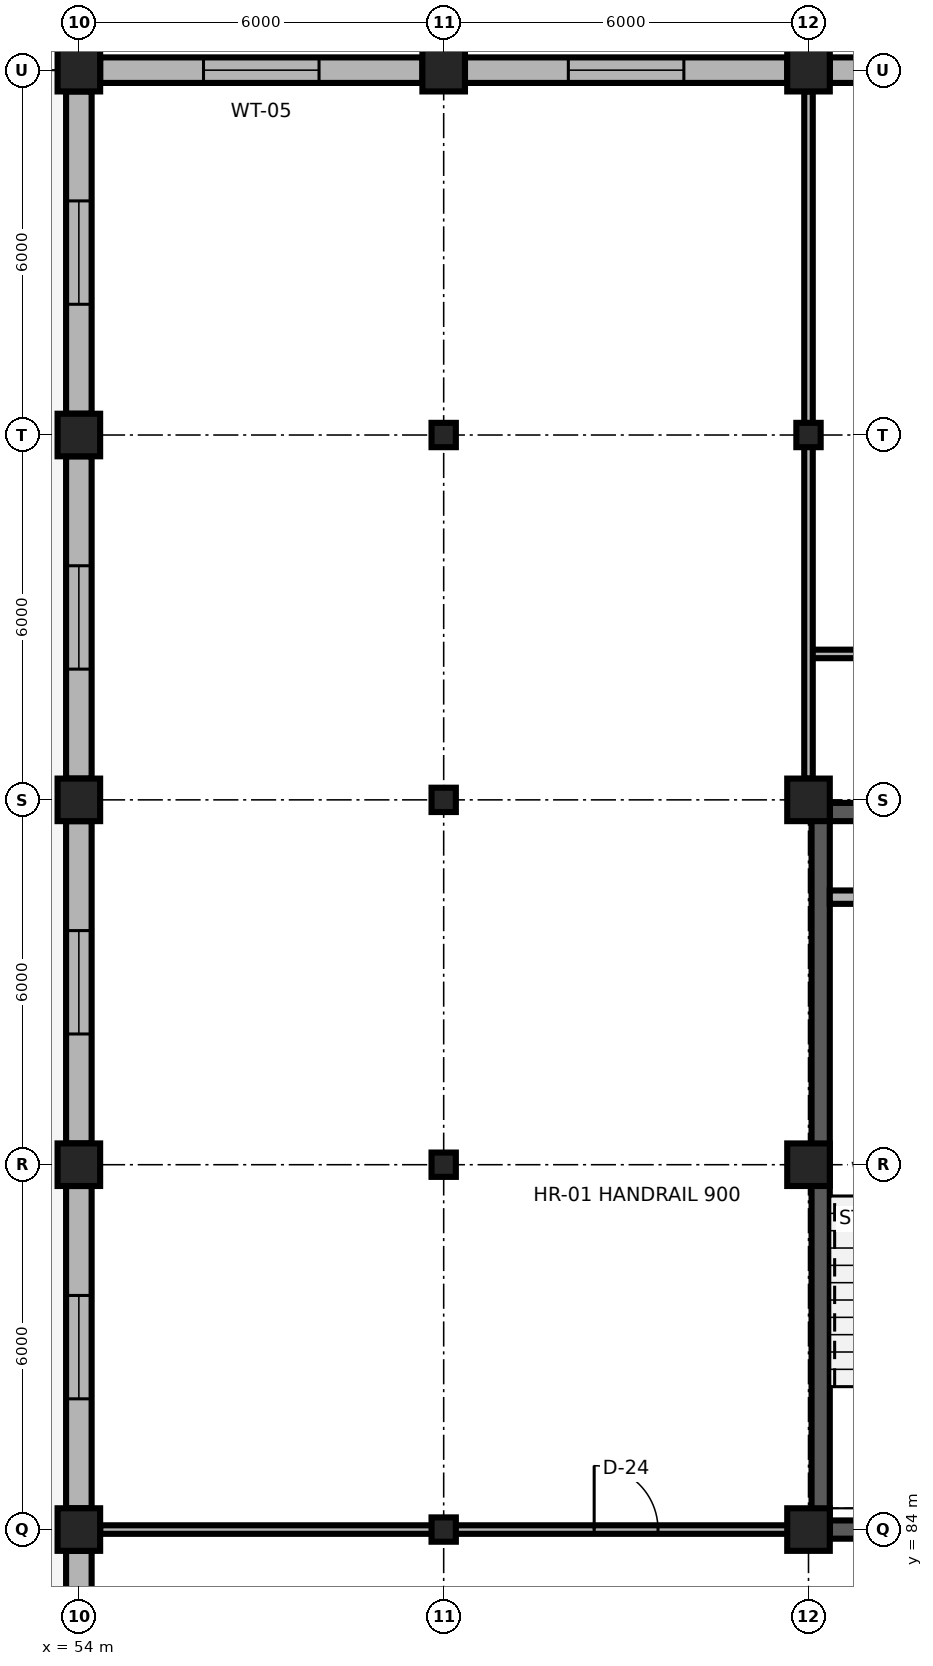
"""IFC4 building model, lengths in metres.
Left out: names, types, materials, properties, quantities, classifications, styles, units other than length and angle.
Written with IfcOpenShell. Run it as: python <this file> out.ifc"""

import sys

from ifc_helpers import new_model, si_unit, direction, frame, frame_2d, origin, origin_2d, place, context, subcontext, project, spatial, rectangle, i_section, extrude, element, fill, save


model = new_model("IFC4")
c1 = context("Model", 3, precision=1e-05, world=origin(), true_north=direction((0.0, 1.0)))
c2 = subcontext(c1, "Body", "Model", "MODEL_VIEW")
j1 = project(units=[si_unit("LENGTHUNIT", "METRE"), si_unit("PLANEANGLEUNIT", "RADIAN")], contexts=[c1])
p1 = place(None, origin())
s1 = spatial("IfcSite", under=j1, at=p1, CompositionType="ELEMENT")
p2 = place(p1, origin())
s2 = spatial("IfcBuilding", under=s1, at=p2, CompositionType="ELEMENT")
p3 = place(p2, frame((0.0, 0.0, 24.9)))
s3 = spatial("IfcBuildingStorey", under=s2, at=p3, CompositionType="ELEMENT", Elevation=24.9)
p4 = place(p3, frame((54.0, 84.0, 0.0), z_axis=(0.0, 0.0, 1.0), x_axis=(1.0, 0.0, 0.0)))
e1 = element("IfcColumn", 1, at=p4, inside=s3, PredefinedType="COLUMN", context=c2, shape_type="SweptSolid", body=[
    extrude(rectangle(XDim=0.7, YDim=0.7, at=origin_2d()), origin(), (0.0, 0.0, 1.0), 3.9),
])
p5 = place(p3, frame((60.0, 84.0, 0.0), z_axis=(0.0, 0.0, 1.0), x_axis=(1.0, 0.0, 0.0)))
e2 = element("IfcColumn", 2, at=p5, inside=s3, PredefinedType="COLUMN", context=c2, shape_type="SweptSolid", body=[
    extrude(i_section(OverallWidth=0.4, OverallDepth=0.4, WebThickness=0.013, FlangeThickness=0.021, FilletRadius=0.022, at=origin_2d()), origin(), (0.0, 0.0, 1.0), 3.9),
])
for number, where, z_axis, x_axis in (
    (3, (66.0, 84.0, 0.0), (0.0, 0.0, 1.0), (1.0, 0.0, 0.0)),
    (4, (54.0, 90.0, 0.0), (0.0, 0.0, 1.0), (1.0, 0.0, 0.0)),
):
    element("IfcColumn", number, at=place(p3, frame(where, z_axis=z_axis, x_axis=x_axis)), inside=s3, PredefinedType="COLUMN", context=c2, shape_type="SweptSolid", body=[
        extrude(rectangle(XDim=0.7, YDim=0.7, at=origin_2d()), origin(), (0.0, 0.0, 1.0), 3.9),
    ])
p6 = place(p3, frame((60.0, 90.0, 0.0), z_axis=(0.0, 0.0, 1.0), x_axis=(1.0, 0.0, 0.0)))
e5 = element("IfcColumn", 5, at=p6, inside=s3, PredefinedType="COLUMN", context=c2, shape_type="SweptSolid", body=[
    extrude(i_section(OverallWidth=0.4, OverallDepth=0.4, WebThickness=0.013, FlangeThickness=0.021, FilletRadius=0.022, at=origin_2d()), origin(), (0.0, 0.0, 1.0), 3.9),
])
for number, where, z_axis, x_axis in (
    (6, (66.0, 90.0, 0.0), (0.0, 0.0, 1.0), (1.0, 0.0, 0.0)),
    (7, (54.0, 96.0, 0.0), (0.0, 0.0, 1.0), (1.0, 0.0, 0.0)),
):
    element("IfcColumn", number, at=place(p3, frame(where, z_axis=z_axis, x_axis=x_axis)), inside=s3, PredefinedType="COLUMN", context=c2, shape_type="SweptSolid", body=[
        extrude(rectangle(XDim=0.7, YDim=0.7, at=origin_2d()), origin(), (0.0, 0.0, 1.0), 3.9),
    ])
p7 = place(p3, frame((60.0, 96.0, 0.0), z_axis=(0.0, 0.0, 1.0), x_axis=(1.0, 0.0, 0.0)))
e8 = element("IfcColumn", 8, at=p7, inside=s3, PredefinedType="COLUMN", context=c2, shape_type="SweptSolid", body=[
    extrude(i_section(OverallWidth=0.4, OverallDepth=0.4, WebThickness=0.013, FlangeThickness=0.021, FilletRadius=0.022, at=origin_2d()), origin(), (0.0, 0.0, 1.0), 3.9),
])
for number, where, z_axis, x_axis in (
    (9, (66.0, 96.0, 0.0), (0.0, 0.0, 1.0), (1.0, 0.0, 0.0)),
    (10, (54.0, 102.0, 0.0), (0.0, 0.0, 1.0), (1.0, 0.0, 0.0)),
):
    element("IfcColumn", number, at=place(p3, frame(where, z_axis=z_axis, x_axis=x_axis)), inside=s3, PredefinedType="COLUMN", context=c2, shape_type="SweptSolid", body=[
        extrude(rectangle(XDim=0.7, YDim=0.7, at=origin_2d()), origin(), (0.0, 0.0, 1.0), 3.9),
    ])
for number, where, z_axis, x_axis in (
    (11, (60.0, 102.0, 0.0), (0.0, 0.0, 1.0), (1.0, 0.0, 0.0)),
    (12, (66.0, 102.0, 0.0), (0.0, 0.0, 1.0), (1.0, 0.0, 0.0)),
):
    element("IfcColumn", number, at=place(p3, frame(where, z_axis=z_axis, x_axis=x_axis)), inside=s3, PredefinedType="COLUMN", context=c2, shape_type="SweptSolid", body=[
        extrude(i_section(OverallWidth=0.4, OverallDepth=0.4, WebThickness=0.013, FlangeThickness=0.021, FilletRadius=0.022, at=origin_2d()), origin(), (0.0, 0.0, 1.0), 3.9),
    ])
for number, where, z_axis, x_axis in (
    (13, (54.0, 108.0, 0.0), (0.0, 0.0, 1.0), (1.0, 0.0, 0.0)),
    (14, (60.0, 108.0, 0.0), (0.0, 0.0, 1.0), (1.0, 0.0, 0.0)),
    (15, (66.0, 108.0, 0.0), (0.0, 0.0, 1.0), (1.0, 0.0, 0.0)),
):
    element("IfcColumn", number, at=place(p3, frame(where, z_axis=z_axis, x_axis=x_axis)), inside=s3, PredefinedType="COLUMN", context=c2, shape_type="SweptSolid", body=[
        extrude(rectangle(XDim=0.7, YDim=0.7, at=origin_2d()), origin(), (0.0, 0.0, 1.0), 3.9),
    ])
p8 = place(p3, frame((54.35, 108.0, 0.0), z_axis=(0.0, 0.0, 1.0), x_axis=(1.0, 0.0, 0.0)))
e16 = element("IfcWall", 16, at=p8, inside=s3, PredefinedType="SOLIDWALL", context=c2, shape_type="SweptSolid", body=[
    extrude(rectangle(XDim=5.3, YDim=0.42, at=frame_2d((2.65, 0.0))), origin(), (0.0, 0.0, 1.0), 3.32),
])
p9 = place(p8, frame((1.7, 0.0, 0.85)))
e17 = element("IfcOpeningElement", 17, at=p9, cuts=e16, PredefinedType="OPENING", context=c2, shape_type="SweptSolid", body=[
    extrude(rectangle(XDim=1.9, YDim=2.1, at=frame_2d((0.95, 1.05))), frame((0.0, 0.225, 0.0), z_axis=(0.0, -1.0, 0.0), x_axis=(1.0, 0.0, 0.0)), (0.0, 0.0, 1.0), 0.45),
])
p10 = place(p3, frame((60.35, 108.0, 0.0), z_axis=(0.0, 0.0, 1.0), x_axis=(1.0, 0.0, 0.0)))
e18 = element("IfcWall", 18, at=p10, inside=s3, PredefinedType="SOLIDWALL", context=c2, shape_type="SweptSolid", body=[
    extrude(rectangle(XDim=5.3, YDim=0.42, at=frame_2d((2.65, 0.0))), origin(), (0.0, 0.0, 1.0), 3.32),
])
p11 = place(p10, frame((1.7, 0.0, 0.85)))
e19 = element("IfcOpeningElement", 19, at=p11, cuts=e18, PredefinedType="OPENING", context=c2, shape_type="SweptSolid", body=[
    extrude(rectangle(XDim=1.9, YDim=2.1, at=frame_2d((0.95, 1.05))), frame((0.0, 0.225, 0.0), z_axis=(0.0, -1.0, 0.0), x_axis=(1.0, 0.0, 0.0)), (0.0, 0.0, 1.0), 0.45),
])
p12 = place(p3, frame((66.35, 108.0, 0.0), z_axis=(0.0, 0.0, 1.0), x_axis=(1.0, 0.0, 0.0)))
e20 = element("IfcWall", 20, at=p12, inside=s3, PredefinedType="SOLIDWALL", context=c2, shape_type="SweptSolid", body=[
    extrude(rectangle(XDim=5.3, YDim=0.42, at=frame_2d((2.65, 0.0))), origin(), (0.0, 0.0, 1.0), 3.32),
])
p13 = place(p12, frame((1.7, 0.0, 0.85)))
e21 = element("IfcOpeningElement", 21, at=p13, cuts=e20, PredefinedType="OPENING", context=c2, shape_type="SweptSolid", body=[
    extrude(rectangle(XDim=1.9, YDim=2.1, at=frame_2d((0.95, 1.05))), frame((0.0, 0.225, 0.0), z_axis=(0.0, -1.0, 0.0), x_axis=(1.0, 0.0, 0.0)), (0.0, 0.0, 1.0), 0.45),
])
p14 = place(p3, frame((54.0, 78.35, 0.0), z_axis=(0.0, 0.0, 1.0), x_axis=(0.0, 1.0, 0.0)))
e22 = element("IfcWall", 22, at=p14, inside=s3, PredefinedType="SOLIDWALL", context=c2, shape_type="SweptSolid", body=[
    extrude(rectangle(XDim=5.3, YDim=0.42, at=frame_2d((2.65, 0.0))), origin(), (0.0, 0.0, 1.0), 3.32),
])
p15 = place(p14, frame((1.8, 0.0, 0.85)))
e23 = element("IfcOpeningElement", 23, at=p15, cuts=e22, PredefinedType="OPENING", context=c2, shape_type="SweptSolid", body=[
    extrude(rectangle(XDim=1.7, YDim=2.05, at=frame_2d((0.85, 1.025))), frame((0.0, 0.225, 0.0), z_axis=(0.0, -1.0, 0.0), x_axis=(1.0, 0.0, 0.0)), (0.0, 0.0, 1.0), 0.45),
])
p16 = place(p3, frame((54.0, 84.35, 0.0), z_axis=(0.0, 0.0, 1.0), x_axis=(0.0, 1.0, 0.0)))
e24 = element("IfcWall", 24, at=p16, inside=s3, PredefinedType="SOLIDWALL", context=c2, shape_type="SweptSolid", body=[
    extrude(rectangle(XDim=5.3, YDim=0.42, at=frame_2d((2.65, 0.0))), origin(), (0.0, 0.0, 1.0), 3.32),
])
p17 = place(p16, frame((1.8, 0.0, 0.85)))
e25 = element("IfcOpeningElement", 25, at=p17, cuts=e24, PredefinedType="OPENING", context=c2, shape_type="SweptSolid", body=[
    extrude(rectangle(XDim=1.7, YDim=2.05, at=frame_2d((0.85, 1.025))), frame((0.0, 0.225, 0.0), z_axis=(0.0, -1.0, 0.0), x_axis=(1.0, 0.0, 0.0)), (0.0, 0.0, 1.0), 0.45),
])
p18 = place(p3, frame((54.0, 90.35, 0.0), z_axis=(0.0, 0.0, 1.0), x_axis=(0.0, 1.0, 0.0)))
e26 = element("IfcWall", 26, at=p18, inside=s3, PredefinedType="SOLIDWALL", context=c2, shape_type="SweptSolid", body=[
    extrude(rectangle(XDim=5.3, YDim=0.42, at=frame_2d((2.65, 0.0))), origin(), (0.0, 0.0, 1.0), 3.32),
])
p19 = place(p18, frame((1.8, 0.0, 0.85)))
e27 = element("IfcOpeningElement", 27, at=p19, cuts=e26, PredefinedType="OPENING", context=c2, shape_type="SweptSolid", body=[
    extrude(rectangle(XDim=1.7, YDim=2.05, at=frame_2d((0.85, 1.025))), frame((0.0, 0.225, 0.0), z_axis=(0.0, -1.0, 0.0), x_axis=(1.0, 0.0, 0.0)), (0.0, 0.0, 1.0), 0.45),
])
p20 = place(p3, frame((54.0, 96.35, 0.0), z_axis=(0.0, 0.0, 1.0), x_axis=(0.0, 1.0, 0.0)))
e28 = element("IfcWall", 28, at=p20, inside=s3, PredefinedType="SOLIDWALL", context=c2, shape_type="SweptSolid", body=[
    extrude(rectangle(XDim=5.3, YDim=0.42, at=frame_2d((2.65, 0.0))), origin(), (0.0, 0.0, 1.0), 3.32),
])
p21 = place(p20, frame((1.8, 0.0, 0.85)))
e29 = element("IfcOpeningElement", 29, at=p21, cuts=e28, PredefinedType="OPENING", context=c2, shape_type="SweptSolid", body=[
    extrude(rectangle(XDim=1.7, YDim=2.05, at=frame_2d((0.85, 1.025))), frame((0.0, 0.225, 0.0), z_axis=(0.0, -1.0, 0.0), x_axis=(1.0, 0.0, 0.0)), (0.0, 0.0, 1.0), 0.45),
])
p22 = place(p3, frame((54.0, 102.35, 0.0), z_axis=(0.0, 0.0, 1.0), x_axis=(0.0, 1.0, 0.0)))
e30 = element("IfcWall", 30, at=p22, inside=s3, PredefinedType="SOLIDWALL", context=c2, shape_type="SweptSolid", body=[
    extrude(rectangle(XDim=5.3, YDim=0.42, at=frame_2d((2.65, 0.0))), origin(), (0.0, 0.0, 1.0), 3.32),
])
p23 = place(p22, frame((1.8, 0.0, 0.85)))
e31 = element("IfcOpeningElement", 31, at=p23, cuts=e30, PredefinedType="OPENING", context=c2, shape_type="SweptSolid", body=[
    extrude(rectangle(XDim=1.7, YDim=2.05, at=frame_2d((0.85, 1.025))), frame((0.0, 0.225, 0.0), z_axis=(0.0, -1.0, 0.0), x_axis=(1.0, 0.0, 0.0)), (0.0, 0.0, 1.0), 0.45),
])
p24 = place(p3, frame((66.35, 84.0, 0.0), z_axis=(0.0, 0.0, 1.0), x_axis=(1.0, 0.0, 0.0)))
e32 = element("IfcWall", 32, at=p24, inside=s3, PredefinedType="SHEAR", context=c2, shape_type="SweptSolid", body=[
    extrude(rectangle(XDim=5.3, YDim=0.3, at=frame_2d((2.65, 0.0))), origin(), (0.0, 0.0, 1.0), 3.66),
])
p25 = place(p24, frame((1.975, 0.0, 0.0)))
e33 = element("IfcOpeningElement", 33, at=p25, cuts=e32, PredefinedType="OPENING", context=c2, shape_type="SweptSolid", body=[
    extrude(rectangle(XDim=1.35, YDim=2.2, at=frame_2d((0.675, 1.1))), frame((0.0, 0.165, 0.0), z_axis=(0.0, -1.0, 0.0), x_axis=(1.0, 0.0, 0.0)), (0.0, 0.0, 1.0), 0.33),
])
p26 = place(p3, frame((66.35, 95.8, 0.0), z_axis=(0.0, 0.0, 1.0), x_axis=(1.0, 0.0, 0.0)))
e34 = element("IfcWall", 34, at=p26, inside=s3, PredefinedType="SHEAR", context=c2, shape_type="SweptSolid", body=[
    extrude(rectangle(XDim=5.3, YDim=0.3, at=frame_2d((2.65, 0.0))), origin(), (0.0, 0.0, 1.0), 3.74),
])
p27 = place(p3, frame((66.2, 84.0, 0.0), z_axis=(0.0, 0.0, 1.0), x_axis=(0.0, 1.0, 0.0)))
e35 = element("IfcWall", 35, at=p27, inside=s3, PredefinedType="SHEAR", context=c2, shape_type="SweptSolid", body=[
    extrude(rectangle(XDim=11.8, YDim=0.3, at=frame_2d((5.9, 0.0))), origin(), (0.0, 0.0, 1.0), 3.74),
])
p28 = place(p3, frame((66.35, 94.4, 0.0), z_axis=(0.0, 0.0, 1.0), x_axis=(1.0, 0.0, 0.0)))
e36 = element("IfcWall", 36, at=p28, inside=s3, PredefinedType="PARTITIONING", context=c2, shape_type="SweptSolid", body=[
    extrude(rectangle(XDim=1.1, YDim=0.22, at=frame_2d((0.55, 0.0))), origin(), (0.0, 0.0, 1.0), 3.74),
])
p29 = place(p3, frame((66.0, 98.4, 0.0), z_axis=(0.0, 0.0, 1.0), x_axis=(1.0, 0.0, 0.0)))
e37 = element("IfcWall", 37, at=p29, inside=s3, PredefinedType="PARTITIONING", context=c2, shape_type="SweptSolid", body=[
    extrude(rectangle(XDim=6.0, YDim=0.14, at=frame_2d((3.0, 0.0))), origin(), (0.0, 0.0, 1.0), 3.74),
])
p30 = place(p29, frame((2.54, 0.0, 0.0)))
e38 = element("IfcOpeningElement", 38, at=p30, cuts=e37, PredefinedType="OPENING", context=c2, shape_type="SweptSolid", body=[
    extrude(rectangle(XDim=0.92, YDim=2.15, at=frame_2d((0.46, 1.075))), frame((0.0, 0.085, 0.0), z_axis=(0.0, -1.0, 0.0), x_axis=(1.0, 0.0, 0.0)), (0.0, 0.0, 1.0), 0.17),
])
p31 = place(p3, frame((60.0, 84.0, 0.0), z_axis=(0.0, 0.0, 1.0), x_axis=(1.0, 0.0, 0.0)))
e39 = element("IfcWall", 39, at=p31, inside=s3, PredefinedType="PARTITIONING", context=c2, shape_type="SweptSolid", body=[
    extrude(rectangle(XDim=6.0, YDim=0.14, at=frame_2d((3.0, 0.0))), origin(), (0.0, 0.0, 1.0), 3.352),
])
p32 = place(p31, frame((2.475, 0.0, 0.0)))
e40 = element("IfcOpeningElement", 40, at=p32, cuts=e39, PredefinedType="OPENING", context=c2, shape_type="SweptSolid", body=[
    extrude(rectangle(XDim=1.05, YDim=2.25, at=frame_2d((0.525, 1.125))), frame((0.0, 0.085, 0.0), z_axis=(0.0, -1.0, 0.0), x_axis=(1.0, 0.0, 0.0)), (0.0, 0.0, 1.0), 0.17),
])
p33 = place(p3, frame((66.0, 96.35, 0.0), z_axis=(0.0, 0.0, 1.0), x_axis=(0.0, 1.0, 0.0)))
e41 = element("IfcWall", 41, at=p33, inside=s3, PredefinedType="PARTITIONING", context=c2, shape_type="SweptSolid", body=[
    extrude(rectangle(XDim=11.3, YDim=0.14, at=frame_2d((5.65, 0.0))), origin(), (0.0, 0.0, 1.0), 3.352),
])
p34 = place(p3, frame((54.35, 84.0, 0.0), z_axis=(0.0, 0.0, 1.0), x_axis=(1.0, 0.0, 0.0)))
e42 = element("IfcWall", 42, at=p34, inside=s3, PredefinedType="PARTITIONING", context=c2, shape_type="SweptSolid", body=[
    extrude(rectangle(XDim=5.65, YDim=0.14, at=frame_2d((2.825, 0.0))), origin(), (0.0, 0.0, 1.0), 3.352),
])
p35 = place(p9, origin())
e43 = element("IfcWindow", 43, at=p35, inside=s3, PartitioningType="SINGLE_PANEL", PredefinedType="WINDOW", context=c2, shape_type="SweptSolid", body=[
    extrude(rectangle(XDim=1.9, YDim=2.1, at=frame_2d((0.95, 1.05))), frame((0.0, 0.03, 0.0), z_axis=(0.0, -1.0, 0.0), x_axis=(1.0, 0.0, 0.0)), (0.0, 0.0, 1.0), 0.06),
])
fill(e17, e43)
p36 = place(p11, origin())
e44 = element("IfcWindow", 44, at=p36, inside=s3, PartitioningType="SINGLE_PANEL", PredefinedType="WINDOW", context=c2, shape_type="SweptSolid", body=[
    extrude(rectangle(XDim=1.9, YDim=2.1, at=frame_2d((0.95, 1.05))), frame((0.0, 0.03, 0.0), z_axis=(0.0, -1.0, 0.0), x_axis=(1.0, 0.0, 0.0)), (0.0, 0.0, 1.0), 0.06),
])
fill(e19, e44)
p37 = place(p17, origin())
e45 = element("IfcWindow", 45, at=p37, inside=s3, PartitioningType="SINGLE_PANEL", PredefinedType="WINDOW", context=c2, shape_type="SweptSolid", body=[
    extrude(rectangle(XDim=1.7, YDim=2.05, at=frame_2d((0.85, 1.025))), frame((0.0, 0.03, 0.0), z_axis=(0.0, -1.0, 0.0), x_axis=(1.0, 0.0, 0.0)), (0.0, 0.0, 1.0), 0.06),
])
fill(e25, e45)
p38 = place(p19, origin())
e46 = element("IfcWindow", 46, at=p38, inside=s3, PartitioningType="SINGLE_PANEL", PredefinedType="WINDOW", context=c2, shape_type="SweptSolid", body=[
    extrude(rectangle(XDim=1.7, YDim=2.05, at=frame_2d((0.85, 1.025))), frame((0.0, 0.03, 0.0), z_axis=(0.0, -1.0, 0.0), x_axis=(1.0, 0.0, 0.0)), (0.0, 0.0, 1.0), 0.06),
])
fill(e27, e46)
p39 = place(p21, origin())
e47 = element("IfcWindow", 47, at=p39, inside=s3, PartitioningType="SINGLE_PANEL", PredefinedType="WINDOW", context=c2, shape_type="SweptSolid", body=[
    extrude(rectangle(XDim=1.7, YDim=2.05, at=frame_2d((0.85, 1.025))), frame((0.0, 0.03, 0.0), z_axis=(0.0, -1.0, 0.0), x_axis=(1.0, 0.0, 0.0)), (0.0, 0.0, 1.0), 0.06),
])
fill(e29, e47)
p40 = place(p23, origin())
e48 = element("IfcWindow", 48, at=p40, inside=s3, PartitioningType="SINGLE_PANEL", PredefinedType="WINDOW", context=c2, shape_type="SweptSolid", body=[
    extrude(rectangle(XDim=1.7, YDim=2.05, at=frame_2d((0.85, 1.025))), frame((0.0, 0.03, 0.0), z_axis=(0.0, -1.0, 0.0), x_axis=(1.0, 0.0, 0.0)), (0.0, 0.0, 1.0), 0.06),
])
fill(e31, e48)
p41 = place(p32, origin())
e49 = element("IfcDoor", 49, at=p41, inside=s3, OperationType="SINGLE_SWING_LEFT", PredefinedType="DOOR", context=c2, shape_type="SweptSolid", body=[
    extrude(rectangle(XDim=1.05, YDim=2.25, at=frame_2d((0.525, 1.125))), frame((0.0, 0.025, 0.0), z_axis=(0.0, -1.0, 0.0), x_axis=(1.0, 0.0, 0.0)), (0.0, 0.0, 1.0), 0.05),
])
fill(e40, e49)
save(model, sys.argv[1])
